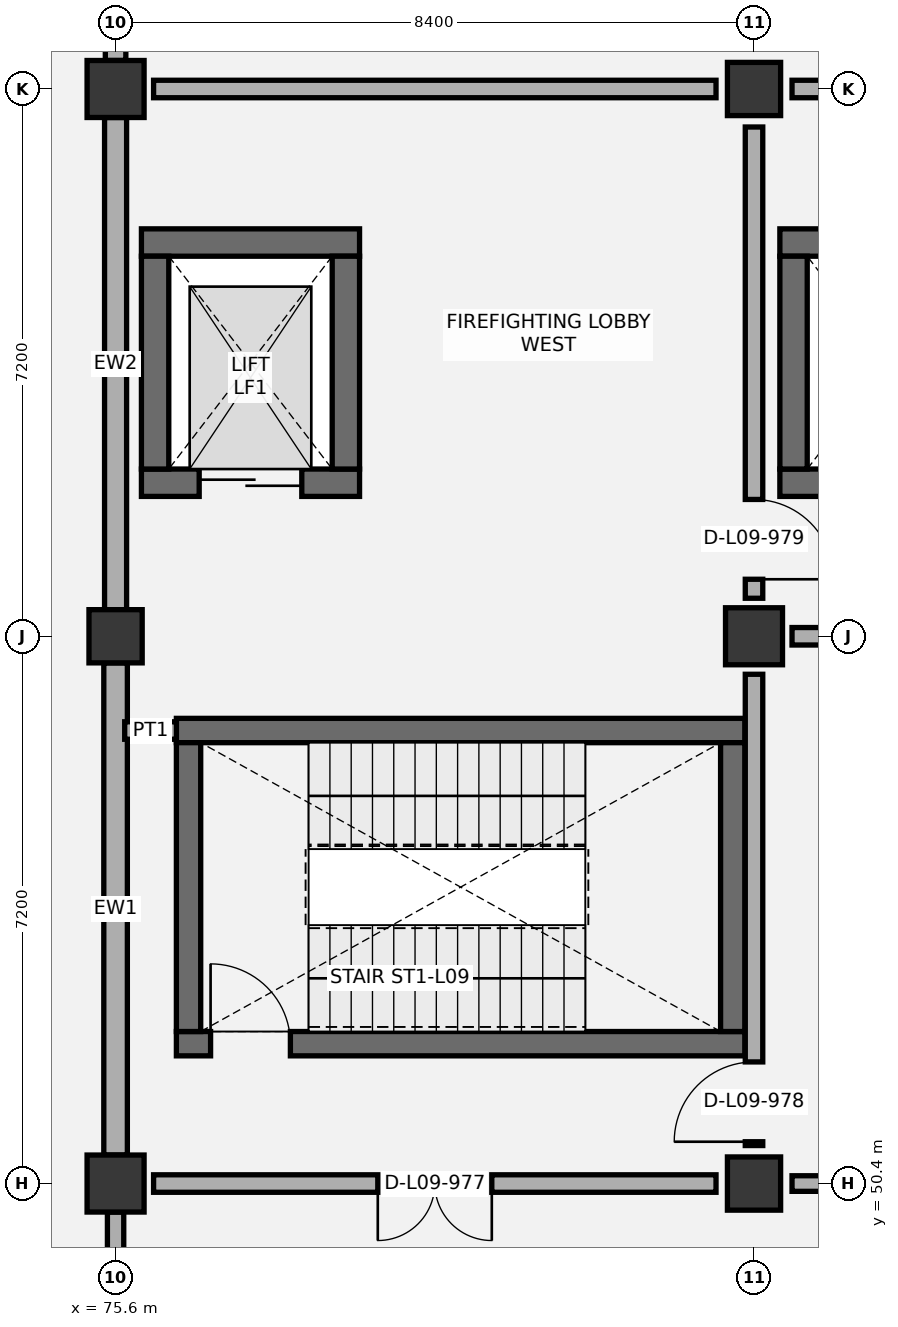
"""IFC4 building model, lengths in metres.
Left out: names, types, materials, properties, quantities, classifications, styles, units other than length and angle.
Written with IfcOpenShell. Run it as: python <this file> out.ifc"""

import sys

from ifc_helpers import new_model, si_unit, direction, frame, frame_2d, origin, origin_2d, place, context, subcontext, project, spatial, rectangle, extrude, element, fill, save


model = new_model("IFC4")
c1 = context("Model", 3, precision=1e-05, world=origin(), true_north=direction((0.0, 1.0)))
c2 = subcontext(c1, "Body", "Model", "MODEL_VIEW")
j1 = project(units=[si_unit("LENGTHUNIT", "METRE"), si_unit("PLANEANGLEUNIT", "RADIAN")], contexts=[c1])
p1 = place(None, origin())
s1 = spatial("IfcSite", under=j1, at=p1, CompositionType="ELEMENT")
p2 = place(p1, origin())
s2 = spatial("IfcBuilding", under=s1, at=p2, CompositionType="ELEMENT")
p3 = place(p2, frame((0.0, 0.0, 43.8)))
s3 = spatial("IfcBuildingStorey", under=s2, at=p3, CompositionType="ELEMENT", Elevation=43.8)
p4 = place(p3, frame((75.6, 50.4, 0.0), z_axis=(0.0, 0.0, 1.0), x_axis=(1.0, 0.0, 0.0)))
e1 = element("IfcColumn", 1, at=p4, inside=s3, PredefinedType="COLUMN", context=c2, shape_type="SweptSolid", body=[
    extrude(rectangle(XDim=0.75, YDim=0.75, at=origin_2d()), origin(), (0.0, 0.0, 1.0), 4.2),
])
p5 = place(p3, frame((75.6, 57.6, 0.0), z_axis=(0.0, 0.0, 1.0), x_axis=(1.0, 0.0, 0.0)))
e2 = element("IfcColumn", 2, at=p5, inside=s3, PredefinedType="COLUMN", context=c2, shape_type="SweptSolid", body=[
    extrude(rectangle(XDim=0.7, YDim=0.7, at=origin_2d()), origin(), (0.0, 0.0, 1.0), 4.2),
])
p6 = place(p3, frame((75.6, 64.8, 0.0), z_axis=(0.0, 0.0, 1.0), x_axis=(1.0, 0.0, 0.0)))
e3 = element("IfcColumn", 3, at=p6, inside=s3, PredefinedType="COLUMN", context=c2, shape_type="SweptSolid", body=[
    extrude(rectangle(XDim=0.75, YDim=0.75, at=origin_2d()), origin(), (0.0, 0.0, 1.0), 4.2),
])
p7 = place(p3, frame((84.0, 50.4, 0.0), z_axis=(0.0, 0.0, 1.0), x_axis=(1.0, 0.0, 0.0)))
e4 = element("IfcColumn", 4, at=p7, inside=s3, PredefinedType="COLUMN", context=c2, shape_type="SweptSolid", body=[
    extrude(rectangle(XDim=0.7, YDim=0.7, at=origin_2d()), origin(), (0.0, 0.0, 1.0), 4.2),
])
p8 = place(p3, frame((84.0, 57.6, 0.0), z_axis=(0.0, 0.0, 1.0), x_axis=(1.0, 0.0, 0.0)))
e5 = element("IfcColumn", 5, at=p8, inside=s3, PredefinedType="COLUMN", context=c2, shape_type="SweptSolid", body=[
    extrude(rectangle(XDim=0.75, YDim=0.75, at=origin_2d()), origin(), (0.0, 0.0, 1.0), 4.2),
])
p9 = place(p3, frame((84.0, 64.8, 0.0), z_axis=(0.0, 0.0, 1.0), x_axis=(1.0, 0.0, 0.0)))
e6 = element("IfcColumn", 6, at=p9, inside=s3, PredefinedType="COLUMN", context=c2, shape_type="SweptSolid", body=[
    extrude(rectangle(XDim=0.7, YDim=0.7, at=origin_2d()), origin(), (0.0, 0.0, 1.0), 4.2),
])
p10 = place(p3, frame((76.4, 52.24, 0.0), z_axis=(0.0, 0.0, 1.0), x_axis=(1.0, 0.0, 0.0)))
e7 = element("IfcWall", 7, at=p10, inside=s3, PredefinedType="SHEAR", context=c2, shape_type="SweptSolid", body=[
    extrude(rectangle(XDim=7.48, YDim=0.32, at=frame_2d((3.74, 0.0))), origin(), (0.0, 0.0, 1.0), 3.9),
])
p11 = place(p10, frame((0.45, 0.0, 0.0)))
e8 = element("IfcOpeningElement", 8, at=p11, cuts=e7, PredefinedType="OPENING", context=c2, shape_type="SweptSolid", body=[
    extrude(rectangle(XDim=1.05, YDim=2.15, at=frame_2d((0.525, 1.075))), frame((0.0, 0.17, 0.0), z_axis=(0.0, -1.0, 0.0), x_axis=(1.0, 0.0, 0.0)), (0.0, 0.0, 1.0), 0.34),
])
p12 = place(p3, frame((76.4, 56.36, 0.0), z_axis=(0.0, 0.0, 1.0), x_axis=(1.0, 0.0, 0.0)))
e9 = element("IfcWall", 9, at=p12, inside=s3, PredefinedType="SHEAR", context=c2, shape_type="SweptSolid", body=[
    extrude(rectangle(XDim=7.48, YDim=0.32, at=frame_2d((3.74, 0.0))), origin(), (0.0, 0.0, 1.0), 3.9),
])
for number, where, z_axis, x_axis in (
    (10, (76.56, 52.4, 0.0), (0.0, 0.0, 1.0), (0.0, 1.0, 0.0)),
    (11, (83.72, 52.4, 0.0), (0.0, 0.0, 1.0), (0.0, 1.0, 0.0)),
):
    element("IfcWall", number, at=place(p3, frame(where, z_axis=z_axis, x_axis=x_axis)), inside=s3, PredefinedType="SHEAR", context=c2, shape_type="SweptSolid", body=[
        extrude(rectangle(XDim=3.8, YDim=0.32, at=frame_2d((1.9, 0.0))), origin(), (0.0, 0.0, 1.0), 3.9),
    ])
p13 = place(p3, frame((75.94, 62.78, 0.0), z_axis=(0.0, 0.0, 1.0), x_axis=(1.0, 0.0, 0.0)))
e12 = element("IfcWall", 12, at=p13, inside=s3, PredefinedType="SHEAR", context=c2, shape_type="SweptSolid", body=[
    extrude(rectangle(XDim=2.87, YDim=0.36, at=frame_2d((1.435, 0.0))), origin(), (0.0, 0.0, 1.0), 3.9),
])
p14 = place(p3, frame((75.94, 59.62, 0.0), z_axis=(0.0, 0.0, 1.0), x_axis=(1.0, 0.0, 0.0)))
e13 = element("IfcWall", 13, at=p14, inside=s3, PredefinedType="SHEAR", context=c2, shape_type="SweptSolid", body=[
    extrude(rectangle(XDim=2.87, YDim=0.36, at=frame_2d((1.435, 0.0))), origin(), (0.0, 0.0, 1.0), 3.9),
])
p15 = place(p14, frame((0.76, 0.0, 0.0)))
e14 = element("IfcOpeningElement", 14, at=p15, cuts=e13, PredefinedType="OPENING", context=c2, shape_type="SweptSolid", body=[
    extrude(rectangle(XDim=1.35, YDim=2.2, at=frame_2d((0.675, 1.1))), frame((0.0, 0.19, 0.0), z_axis=(0.0, -1.0, 0.0), x_axis=(1.0, 0.0, 0.0)), (0.0, 0.0, 1.0), 0.38),
])
for number, where, z_axis, x_axis in (
    (15, (76.12, 59.8, 0.0), (0.0, 0.0, 1.0), (0.0, 1.0, 0.0)),
    (16, (78.63, 59.8, 0.0), (0.0, 0.0, 1.0), (0.0, 1.0, 0.0)),
):
    element("IfcWall", number, at=place(p3, frame(where, z_axis=z_axis, x_axis=x_axis)), inside=s3, PredefinedType="SHEAR", context=c2, shape_type="SweptSolid", body=[
        extrude(rectangle(XDim=2.8, YDim=0.36, at=frame_2d((1.4, 0.0))), origin(), (0.0, 0.0, 1.0), 3.9),
    ])
p16 = place(p3, frame((84.34, 62.78, 0.0), z_axis=(0.0, 0.0, 1.0), x_axis=(1.0, 0.0, 0.0)))
e17 = element("IfcWall", 17, at=p16, inside=s3, PredefinedType="SHEAR", context=c2, shape_type="SweptSolid", body=[
    extrude(rectangle(XDim=7.77, YDim=0.36, at=frame_2d((3.885, 0.0))), origin(), (0.0, 0.0, 1.0), 3.9),
])
p17 = place(p3, frame((84.34, 59.62, 0.0), z_axis=(0.0, 0.0, 1.0), x_axis=(1.0, 0.0, 0.0)))
e18 = element("IfcWall", 18, at=p17, inside=s3, PredefinedType="SHEAR", context=c2, shape_type="SweptSolid", body=[
    extrude(rectangle(XDim=2.66, YDim=0.36, at=frame_2d((1.33, 0.0))), origin(), (0.0, 0.0, 1.0), 3.9),
])
p18 = place(p17, frame((0.78, 0.0, 0.0)))
e19 = element("IfcOpeningElement", 19, at=p18, cuts=e18, PredefinedType="OPENING", context=c2, shape_type="SweptSolid", body=[
    extrude(rectangle(XDim=1.1, YDim=2.15, at=frame_2d((0.55, 1.075))), frame((0.0, 0.19, 0.0), z_axis=(0.0, -1.0, 0.0), x_axis=(1.0, 0.0, 0.0)), (0.0, 0.0, 1.0), 0.38),
])
p19 = place(p3, frame((84.52, 59.8, 0.0), z_axis=(0.0, 0.0, 1.0), x_axis=(0.0, 1.0, 0.0)))
e20 = element("IfcWall", 20, at=p19, inside=s3, PredefinedType="SHEAR", context=c2, shape_type="SweptSolid", body=[
    extrude(rectangle(XDim=2.8, YDim=0.36, at=frame_2d((1.4, 0.0))), origin(), (0.0, 0.0, 1.0), 3.9),
])
p20 = place(p3, frame((75.6, 43.55, 0.0), z_axis=(0.0, 0.0, 1.0), x_axis=(0.0, 1.0, 0.0)))
e21 = element("IfcWall", 21, at=p20, inside=s3, PredefinedType="SOLIDWALL", context=c2, shape_type="SweptSolid", body=[
    extrude(rectangle(XDim=6.475, YDim=0.215, at=frame_2d((3.237, 0.0))), origin(), (0.0, 0.0, 1.0), 3.345),
])
p21 = place(p20, frame((2.238, 0.0, 0.0)))
e22 = element("IfcOpeningElement", 22, at=p21, cuts=e21, PredefinedType="OPENING", context=c2, shape_type="SweptSolid", body=[
    extrude(rectangle(XDim=2.0, YDim=2.4, at=frame_2d((1.0, 1.2))), frame((0.0, 0.117, 0.0), z_axis=(0.0, -1.0, 0.0), x_axis=(1.0, 0.0, 0.0)), (0.0, 0.0, 1.0), 0.235),
])
p22 = place(p3, frame((75.6, 50.775, 0.0), z_axis=(0.0, 0.0, 1.0), x_axis=(0.0, 1.0, 0.0)))
e23 = element("IfcWall", 23, at=p22, inside=s3, PredefinedType="SOLIDWALL", context=c2, shape_type="SweptSolid", body=[
    extrude(rectangle(XDim=6.475, YDim=0.31, at=frame_2d((3.238, 0.0))), origin(), (0.0, 0.0, 1.0), 3.345),
])
p23 = place(p3, frame((75.6, 57.95, 0.0), z_axis=(0.0, 0.0, 1.0), x_axis=(0.0, 1.0, 0.0)))
e24 = element("IfcWall", 24, at=p23, inside=s3, PredefinedType="SOLIDWALL", context=c2, shape_type="SweptSolid", body=[
    extrude(rectangle(XDim=6.475, YDim=0.29, at=frame_2d((3.238, 0.0))), origin(), (0.0, 0.0, 1.0), 3.345),
])
p24 = place(p3, frame((75.6, 65.175, 0.0), z_axis=(0.0, 0.0, 1.0), x_axis=(0.0, 1.0, 0.0)))
e25 = element("IfcWall", 25, at=p24, inside=s3, PredefinedType="SOLIDWALL", context=c2, shape_type="SweptSolid", body=[
    extrude(rectangle(XDim=6.475, YDim=0.27, at=frame_2d((3.237, 0.0))), origin(), (0.0, 0.0, 1.0), 3.345),
])
p25 = place(p24, frame((2.238, 0.0, 0.0)))
e26 = element("IfcOpeningElement", 26, at=p25, cuts=e25, PredefinedType="OPENING", context=c2, shape_type="SweptSolid", body=[
    extrude(rectangle(XDim=2.0, YDim=2.4, at=frame_2d((1.0, 1.2))), frame((0.0, 0.145, 0.0), z_axis=(0.0, -1.0, 0.0), x_axis=(1.0, 0.0, 0.0)), (0.0, 0.0, 1.0), 0.29),
])
p26 = place(p3, frame((76.1, 50.4, 0.0), z_axis=(0.0, 0.0, 1.0), x_axis=(1.0, 0.0, 0.0)))
e27 = element("IfcWall", 27, at=p26, inside=s3, PredefinedType="PARTITIONING", context=c2, shape_type="SweptSolid", body=[
    extrude(rectangle(XDim=7.4, YDim=0.23, at=frame_2d((3.7, 0.0))), origin(), (0.0, 0.0, 1.0), 3.625),
])
p27 = place(p26, frame((2.95, 0.0, 0.0)))
e28 = element("IfcOpeningElement", 28, at=p27, cuts=e27, PredefinedType="OPENING", context=c2, shape_type="SweptSolid", body=[
    extrude(rectangle(XDim=1.5, YDim=2.15, at=frame_2d((0.75, 1.075))), frame((0.0, 0.125, 0.0), z_axis=(0.0, -1.0, 0.0), x_axis=(1.0, 0.0, 0.0)), (0.0, 0.0, 1.0), 0.25),
])
p28 = place(p3, frame((84.0, 50.9, 0.0), z_axis=(0.0, 0.0, 1.0), x_axis=(0.0, 1.0, 0.0)))
e29 = element("IfcWall", 29, at=p28, inside=s3, PredefinedType="PARTITIONING", context=c2, shape_type="SweptSolid", body=[
    extrude(rectangle(XDim=6.2, YDim=0.23, at=frame_2d((3.1, 0.0))), origin(), (0.0, 0.0, 1.0), 3.605),
])
p29 = place(p28, frame((0.05, 0.0, 0.0)))
e30 = element("IfcOpeningElement", 30, at=p29, cuts=e29, PredefinedType="OPENING", context=c2, shape_type="SweptSolid", body=[
    extrude(rectangle(XDim=1.05, YDim=2.15, at=frame_2d((0.525, 1.075))), frame((0.0, 0.125, 0.0), z_axis=(0.0, -1.0, 0.0), x_axis=(1.0, 0.0, 0.0)), (0.0, 0.0, 1.0), 0.25),
])
p30 = place(p3, frame((75.72, 56.36, 0.0), z_axis=(0.0, 0.0, 1.0), x_axis=(1.0, 0.0, 0.0)))
e31 = element("IfcWall", 31, at=p30, inside=s3, PredefinedType="PARTITIONING", context=c2, shape_type="SweptSolid", body=[
    extrude(rectangle(XDim=0.68, YDim=0.23, at=frame_2d((0.34, 0.0))), origin(), (0.0, 0.0, 1.0), 3.9),
])
p31 = place(p3, frame((84.0, 58.1, 0.0), z_axis=(0.0, 0.0, 1.0), x_axis=(0.0, 1.0, 0.0)))
e32 = element("IfcWall", 32, at=p31, inside=s3, PredefinedType="PARTITIONING", context=c2, shape_type="SweptSolid", body=[
    extrude(rectangle(XDim=6.2, YDim=0.23, at=frame_2d((3.1, 0.0))), origin(), (0.0, 0.0, 1.0), 3.345),
])
p32 = place(p31, frame((0.25, 0.0, 0.0)))
e33 = element("IfcOpeningElement", 33, at=p32, cuts=e32, PredefinedType="OPENING", context=c2, shape_type="SweptSolid", body=[
    extrude(rectangle(XDim=1.05, YDim=2.15, at=frame_2d((0.525, 1.075))), frame((0.0, 0.125, 0.0), z_axis=(0.0, -1.0, 0.0), x_axis=(1.0, 0.0, 0.0)), (0.0, 0.0, 1.0), 0.25),
])
p33 = place(p3, frame((76.1, 64.8, 0.0), z_axis=(0.0, 0.0, 1.0), x_axis=(1.0, 0.0, 0.0)))
e34 = element("IfcWall", 34, at=p33, inside=s3, PredefinedType="PARTITIONING", context=c2, shape_type="SweptSolid", body=[
    extrude(rectangle(XDim=7.4, YDim=0.23, at=frame_2d((3.7, 0.0))), origin(), (0.0, 0.0, 1.0), 3.625),
])
p34 = place(p3, frame((84.5, 50.4, 0.0), z_axis=(0.0, 0.0, 1.0), x_axis=(1.0, 0.0, 0.0)))
e35 = element("IfcWall", 35, at=p34, inside=s3, PredefinedType="PARTITIONING", context=c2, shape_type="SweptSolid", body=[
    extrude(rectangle(XDim=7.4, YDim=0.205, at=frame_2d((3.7, 0.0))), origin(), (0.0, 0.0, 1.0), 3.295),
])
p35 = place(p34, frame((3.05, 0.0, 0.0)))
e36 = element("IfcOpeningElement", 36, at=p35, cuts=e35, PredefinedType="OPENING", context=c2, shape_type="SweptSolid", body=[
    extrude(rectangle(XDim=1.3, YDim=2.15, at=frame_2d((0.65, 1.075))), frame((0.0, 0.113, 0.0), z_axis=(0.0, -1.0, 0.0), x_axis=(1.0, 0.0, 0.0)), (0.0, 0.0, 1.0), 0.225),
])
p36 = place(p3, frame((84.5, 57.6, 0.0), z_axis=(0.0, 0.0, 1.0), x_axis=(1.0, 0.0, 0.0)))
e37 = element("IfcWall", 37, at=p36, inside=s3, PredefinedType="PARTITIONING", context=c2, shape_type="SweptSolid", body=[
    extrude(rectangle(XDim=7.4, YDim=0.23, at=frame_2d((3.7, 0.0))), origin(), (0.0, 0.0, 1.0), 3.295),
])
p37 = place(p36, frame((2.95, 0.0, 0.0)))
e38 = element("IfcOpeningElement", 38, at=p37, cuts=e37, PredefinedType="OPENING", context=c2, shape_type="SweptSolid", body=[
    extrude(rectangle(XDim=1.5, YDim=2.15, at=frame_2d((0.75, 1.075))), frame((0.0, 0.125, 0.0), z_axis=(0.0, -1.0, 0.0), x_axis=(1.0, 0.0, 0.0)), (0.0, 0.0, 1.0), 0.25),
])
p38 = place(p3, frame((84.5, 64.8, 0.0), z_axis=(0.0, 0.0, 1.0), x_axis=(1.0, 0.0, 0.0)))
e39 = element("IfcWall", 39, at=p38, inside=s3, PredefinedType="PARTITIONING", context=c2, shape_type="SweptSolid", body=[
    extrude(rectangle(XDim=7.4, YDim=0.23, at=frame_2d((3.7, 0.0))), origin(), (0.0, 0.0, 1.0), 3.295),
])
p39 = place(p11, origin())
e40 = element("IfcDoor", 40, at=p39, inside=s3, OperationType="SINGLE_SWING_LEFT", PredefinedType="DOOR", context=c2, shape_type="SweptSolid", body=[
    extrude(rectangle(XDim=1.05, YDim=2.15, at=frame_2d((0.525, 1.075))), frame((0.0, 0.025, 0.0), z_axis=(0.0, -1.0, 0.0), x_axis=(1.0, 0.0, 0.0)), (0.0, 0.0, 1.0), 0.05),
])
fill(e8, e40)
p40 = place(p15, origin())
e41 = element("IfcDoor", 41, at=p40, inside=s3, OperationType="DOUBLE_DOOR_SLIDING", PredefinedType="DOOR", context=c2, shape_type="SweptSolid", body=[
    extrude(rectangle(XDim=1.35, YDim=2.2, at=frame_2d((0.675, 1.1))), frame((0.0, 0.025, 0.0), z_axis=(0.0, -1.0, 0.0), x_axis=(1.0, 0.0, 0.0)), (0.0, 0.0, 1.0), 0.05),
])
fill(e14, e41)
p41 = place(p27, frame((1.5, 0.0, 0.0), z_axis=(0.0, 0.0, 1.0), x_axis=(-1.0, 0.0, 0.0)))
e42 = element("IfcDoor", 42, at=p41, inside=s3, OperationType="DOUBLE_DOOR_SINGLE_SWING", PredefinedType="DOOR", context=c2, shape_type="SweptSolid", body=[
    extrude(rectangle(XDim=1.5, YDim=2.15, at=frame_2d((0.75, 1.075))), frame((0.0, 0.025, 0.0), z_axis=(0.0, -1.0, 0.0), x_axis=(1.0, 0.0, 0.0)), (0.0, 0.0, 1.0), 0.05),
])
fill(e28, e42)
p42 = place(p29, origin())
e43 = element("IfcDoor", 43, at=p42, inside=s3, OperationType="SINGLE_SWING_LEFT", PredefinedType="DOOR", context=c2, shape_type="SweptSolid", body=[
    extrude(rectangle(XDim=1.05, YDim=2.15, at=frame_2d((0.525, 1.075))), frame((0.0, 0.025, 0.0), z_axis=(0.0, -1.0, 0.0), x_axis=(1.0, 0.0, 0.0)), (0.0, 0.0, 1.0), 0.05),
])
fill(e30, e43)
p43 = place(p32, frame((1.05, 0.0, 0.0), z_axis=(0.0, 0.0, 1.0), x_axis=(-1.0, 0.0, 0.0)))
e44 = element("IfcDoor", 44, at=p43, inside=s3, OperationType="SINGLE_SWING_RIGHT", PredefinedType="DOOR", context=c2, shape_type="SweptSolid", body=[
    extrude(rectangle(XDim=1.05, YDim=2.15, at=frame_2d((0.525, 1.075))), frame((0.0, 0.025, 0.0), z_axis=(0.0, -1.0, 0.0), x_axis=(1.0, 0.0, 0.0)), (0.0, 0.0, 1.0), 0.05),
])
fill(e33, e44)
save(model, sys.argv[1])
